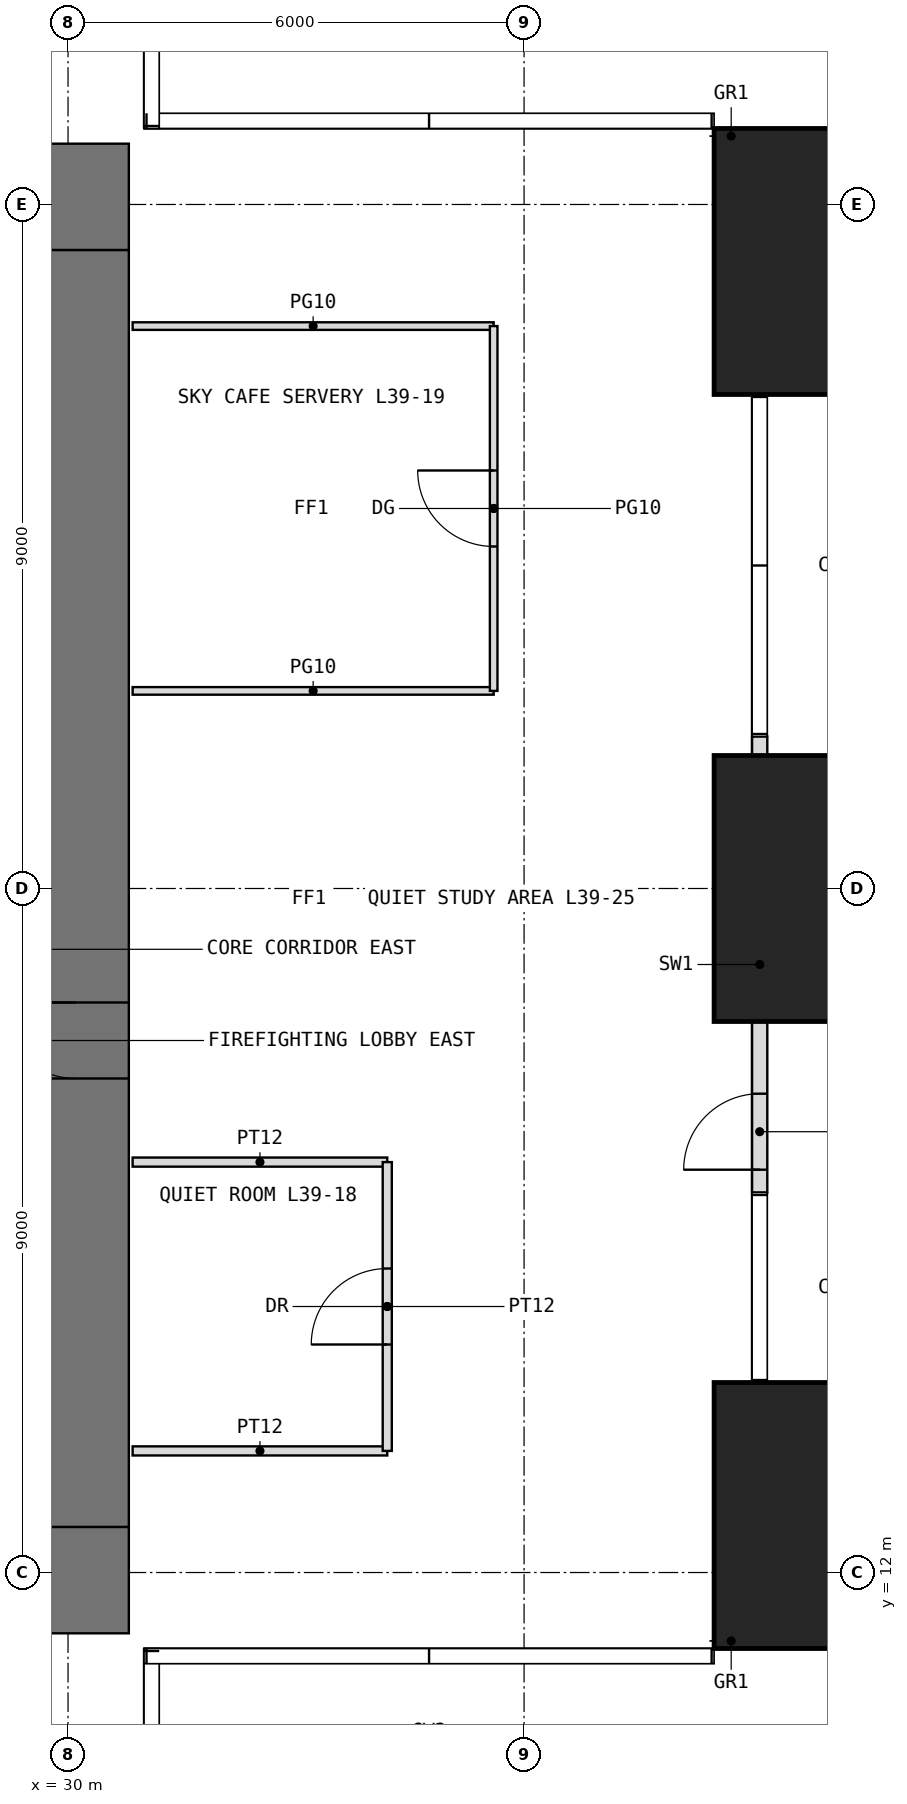
"""IFC4 building model, lengths in metres.
Left out: names, types, materials, properties, quantities, classifications, styles, units other than length and angle.
Written with IfcOpenShell. Run it as: python <this file> out.ifc"""

import sys

from ifc_helpers import new_model, si_unit, direction, frame, frame_2d, origin, origin_2d, place, context, subcontext, project, spatial, rectangle, extrude, element, fill, save


model = new_model("IFC4")
c1 = context("Model", 3, precision=1e-05, world=origin(), true_north=direction((0.0, 1.0)))
c2 = subcontext(c1, "Body", "Model", "MODEL_VIEW")
j1 = project(units=[si_unit("LENGTHUNIT", "METRE"), si_unit("PLANEANGLEUNIT", "RADIAN")], contexts=[c1])
p1 = place(None, origin())
s1 = spatial("IfcSite", under=j1, at=p1, CompositionType="ELEMENT")
p2 = place(p1, origin())
s2 = spatial("IfcBuilding", under=s1, at=p2, CompositionType="ELEMENT")
p3 = place(p2, frame((0.0, 0.0, 165.5)))
s3 = spatial("IfcBuildingStorey", under=s2, at=p3, CompositionType="ELEMENT", Elevation=165.5)
for number, where, z_axis, x_axis in (
    (1, (40.25, 12.75, 0.0), (0.0, 0.0, 1.0), (1.0, 0.0, 0.0)),
    (2, (40.25, 21.0, 0.0), (0.0, 0.0, 1.0), (1.0, 0.0, 0.0)),
    (3, (40.25, 29.25, 0.0), (0.0, 0.0, 1.0), (1.0, 0.0, 0.0)),
):
    element("IfcColumn", number, at=place(p3, frame(where, z_axis=z_axis, x_axis=x_axis)), inside=s3, PredefinedType="COLUMN", context=c2, shape_type="SweptSolid", body=[
        extrude(rectangle(XDim=3.5, YDim=3.5, at=origin_2d()), origin(), (0.0, 0.0, 1.0), 5.0),
    ])
p4 = place(p3, frame((39.1, 17.0, 0.0), z_axis=(0.0, 0.0, 1.0), x_axis=(0.0, 1.0, 0.0)))
e4 = element("IfcWall", 4, at=p4, inside=s3, PredefinedType="USERDEFINED", context=c2, shape_type="SweptSolid", body=[
    extrude(rectangle(XDim=6.0, YDim=0.2, at=frame_2d((3.0, 0.0))), origin(), (0.0, 0.0, 1.0), 4.75),
])
p5 = place(p4, frame((0.3, 0.0, 0.0)))
e5 = element("IfcOpeningElement", 5, at=p5, cuts=e4, PredefinedType="OPENING", context=c2, shape_type="SweptSolid", body=[
    extrude(rectangle(XDim=1.0, YDim=2.4, at=frame_2d((0.5, 1.2))), frame((0.0, 0.11, 0.0), z_axis=(0.0, -1.0, 0.0), x_axis=(1.0, 0.0, 0.0)), (0.0, 0.0, 1.0), 0.22),
])
p6 = place(p3, frame((11.2, 11.9, -0.05), z_axis=(0.0, 0.0, 1.0), x_axis=(1.0, 0.0, 0.0)))
e6 = element("IfcWall", 6, at=p6, inside=s3, PredefinedType="SHEAR", context=c2, shape_type="SweptSolid", body=[
    extrude(rectangle(XDim=19.6, YDim=1.4, at=frame_2d((9.8, 0.0))), origin(), (0.0, 0.0, 1.0), 5.0),
])
p7 = place(p6, frame((8.8, 0.0, 0.05)))
e7 = element("IfcOpeningElement", 7, at=p7, cuts=e6, PredefinedType="OPENING", context=c2, shape_type="SweptSolid", body=[
    extrude(rectangle(XDim=2.0, YDim=2.2, at=frame_2d((1.0, 1.1))), frame((0.0, 0.71, 0.0), z_axis=(0.0, -1.0, 0.0), x_axis=(1.0, 0.0, 0.0)), (0.0, 0.0, 1.0), 1.42),
])
p8 = place(p3, frame((11.2, 30.1, -0.05), z_axis=(0.0, 0.0, 1.0), x_axis=(1.0, 0.0, 0.0)))
e8 = element("IfcWall", 8, at=p8, inside=s3, PredefinedType="SHEAR", context=c2, shape_type="SweptSolid", body=[
    extrude(rectangle(XDim=19.6, YDim=1.4, at=frame_2d((9.8, 0.0))), origin(), (0.0, 0.0, 1.0), 5.0),
])
p9 = place(p8, frame((8.8, 0.0, 0.05)))
e9 = element("IfcOpeningElement", 9, at=p9, cuts=e8, PredefinedType="OPENING", context=c2, shape_type="SweptSolid", body=[
    extrude(rectangle(XDim=2.0, YDim=2.2, at=frame_2d((1.0, 1.1))), frame((0.0, 0.71, 0.0), z_axis=(0.0, -1.0, 0.0), x_axis=(1.0, 0.0, 0.0)), (0.0, 0.0, 1.0), 1.42),
])
p10 = place(p3, frame((30.1, 12.6, -0.05), z_axis=(0.0, 0.0, 1.0), x_axis=(0.0, 1.0, 0.0)))
e10 = element("IfcWall", 10, at=p10, inside=s3, PredefinedType="SHEAR", context=c2, shape_type="SweptSolid", body=[
    extrude(rectangle(XDim=16.8, YDim=1.4, at=frame_2d((8.4, 0.0))), origin(), (0.0, 0.0, 1.0), 5.0),
])
p11 = place(p10, frame((5.9, 0.0, 0.05)))
e11 = element("IfcOpeningElement", 11, at=p11, cuts=e10, PredefinedType="OPENING", context=c2, shape_type="SweptSolid", body=[
    extrude(rectangle(XDim=1.0, YDim=2.2, at=frame_2d((0.5, 1.1))), frame((0.0, 0.71, 0.0), z_axis=(0.0, -1.0, 0.0), x_axis=(1.0, 0.0, 0.0)), (0.0, 0.0, 1.0), 1.42),
])
for number, where, z_axis, x_axis in (
    (12, (30.85, 13.6, 0.0), (0.0, 0.0, 1.0), (1.0, 0.0, 0.0)),
    (13, (30.85, 17.4, 0.0), (0.0, 0.0, 1.0), (1.0, 0.0, 0.0)),
):
    element("IfcWall", number, at=place(p3, frame(where, z_axis=z_axis, x_axis=x_axis)), inside=s3, PredefinedType="PARTITIONING", context=c2, shape_type="SweptSolid", body=[
        extrude(rectangle(XDim=3.35, YDim=0.12, at=frame_2d((1.675, 0.0))), origin(), (0.0, 0.0, 1.0), 4.75),
    ])
for number, where, z_axis, x_axis in (
    (14, (30.85, 23.6, 0.0), (0.0, 0.0, 1.0), (1.0, 0.0, 0.0)),
    (15, (30.85, 28.4, 0.0), (0.0, 0.0, 1.0), (1.0, 0.0, 0.0)),
):
    element("IfcWall", number, at=place(p3, frame(where, z_axis=z_axis, x_axis=x_axis)), inside=s3, PredefinedType="PARTITIONING", context=c2, shape_type="SweptSolid", body=[
        extrude(rectangle(XDim=4.75, YDim=0.1, at=frame_2d((2.375, 0.0))), origin(), (0.0, 0.0, 1.0), 4.75),
    ])
p12 = place(p3, frame((34.2, 13.6, 0.0), z_axis=(0.0, 0.0, 1.0), x_axis=(0.0, 1.0, 0.0)))
e16 = element("IfcWall", 16, at=p12, inside=s3, PredefinedType="PARTITIONING", context=c2, shape_type="SweptSolid", body=[
    extrude(rectangle(XDim=3.8, YDim=0.12, at=frame_2d((1.9, 0.0))), origin(), (0.0, 0.0, 1.0), 4.75),
])
p13 = place(p12, frame((1.4, 0.0, 0.0)))
e17 = element("IfcOpeningElement", 17, at=p13, cuts=e16, PredefinedType="OPENING", context=c2, shape_type="SweptSolid", body=[
    extrude(rectangle(XDim=1.0, YDim=2.2, at=frame_2d((0.5, 1.1))), frame((0.0, 0.07, 0.0), z_axis=(0.0, -1.0, 0.0), x_axis=(1.0, 0.0, 0.0)), (0.0, 0.0, 1.0), 0.14),
])
p14 = place(p3, frame((35.6, 23.6, 0.0), z_axis=(0.0, 0.0, 1.0), x_axis=(0.0, 1.0, 0.0)))
e18 = element("IfcWall", 18, at=p14, inside=s3, PredefinedType="PARTITIONING", context=c2, shape_type="SweptSolid", body=[
    extrude(rectangle(XDim=4.8, YDim=0.1, at=frame_2d((2.4, 0.0))), origin(), (0.0, 0.0, 1.0), 4.75),
])
p15 = place(p14, frame((1.9, 0.0, 0.0)))
e19 = element("IfcOpeningElement", 19, at=p15, cuts=e18, PredefinedType="OPENING", context=c2, shape_type="SweptSolid", body=[
    extrude(rectangle(XDim=1.0, YDim=2.4, at=frame_2d((0.5, 1.2))), frame((0.0, 0.06, 0.0), z_axis=(0.0, -1.0, 0.0), x_axis=(1.0, 0.0, 0.0)), (0.0, 0.0, 1.0), 0.12),
])
p16 = place(p5, origin())
e20 = element("IfcDoor", 20, at=p16, inside=s3, OperationType="SINGLE_SWING_LEFT", PredefinedType="DOOR", context=c2, shape_type="SweptSolid", body=[
    extrude(rectangle(XDim=1.0, YDim=2.4, at=frame_2d((0.5, 1.2))), frame((0.0, 0.025, 0.0), z_axis=(0.0, -1.0, 0.0), x_axis=(1.0, 0.0, 0.0)), (0.0, 0.0, 1.0), 0.05),
])
fill(e5, e20)
p17 = place(p11, origin())
e21 = element("IfcDoor", 21, at=p17, inside=s3, OperationType="SINGLE_SWING_RIGHT", PredefinedType="DOOR", context=c2, shape_type="SweptSolid", body=[
    extrude(rectangle(XDim=1.0, YDim=2.2, at=frame_2d((0.5, 1.1))), frame((0.0, 0.025, 0.0), z_axis=(0.0, -1.0, 0.0), x_axis=(1.0, 0.0, 0.0)), (0.0, 0.0, 1.0), 0.05),
])
fill(e11, e21)
p18 = place(p13, origin())
e22 = element("IfcDoor", 22, at=p18, inside=s3, OperationType="SINGLE_SWING_LEFT", PredefinedType="DOOR", context=c2, shape_type="SweptSolid", body=[
    extrude(rectangle(XDim=1.0, YDim=2.2, at=frame_2d((0.5, 1.1))), frame((0.0, 0.025, 0.0), z_axis=(0.0, -1.0, 0.0), x_axis=(1.0, 0.0, 0.0)), (0.0, 0.0, 1.0), 0.05),
])
fill(e17, e22)
p19 = place(p15, origin())
e23 = element("IfcDoor", 23, at=p19, inside=s3, OperationType="SINGLE_SWING_RIGHT", PredefinedType="DOOR", context=c2, shape_type="SweptSolid", body=[
    extrude(rectangle(XDim=1.0, YDim=2.4, at=frame_2d((0.5, 1.2))), frame((0.0, 0.025, 0.0), z_axis=(0.0, -1.0, 0.0), x_axis=(1.0, 0.0, 0.0)), (0.0, 0.0, 1.0), 0.05),
])
fill(e19, e23)
save(model, sys.argv[1])
